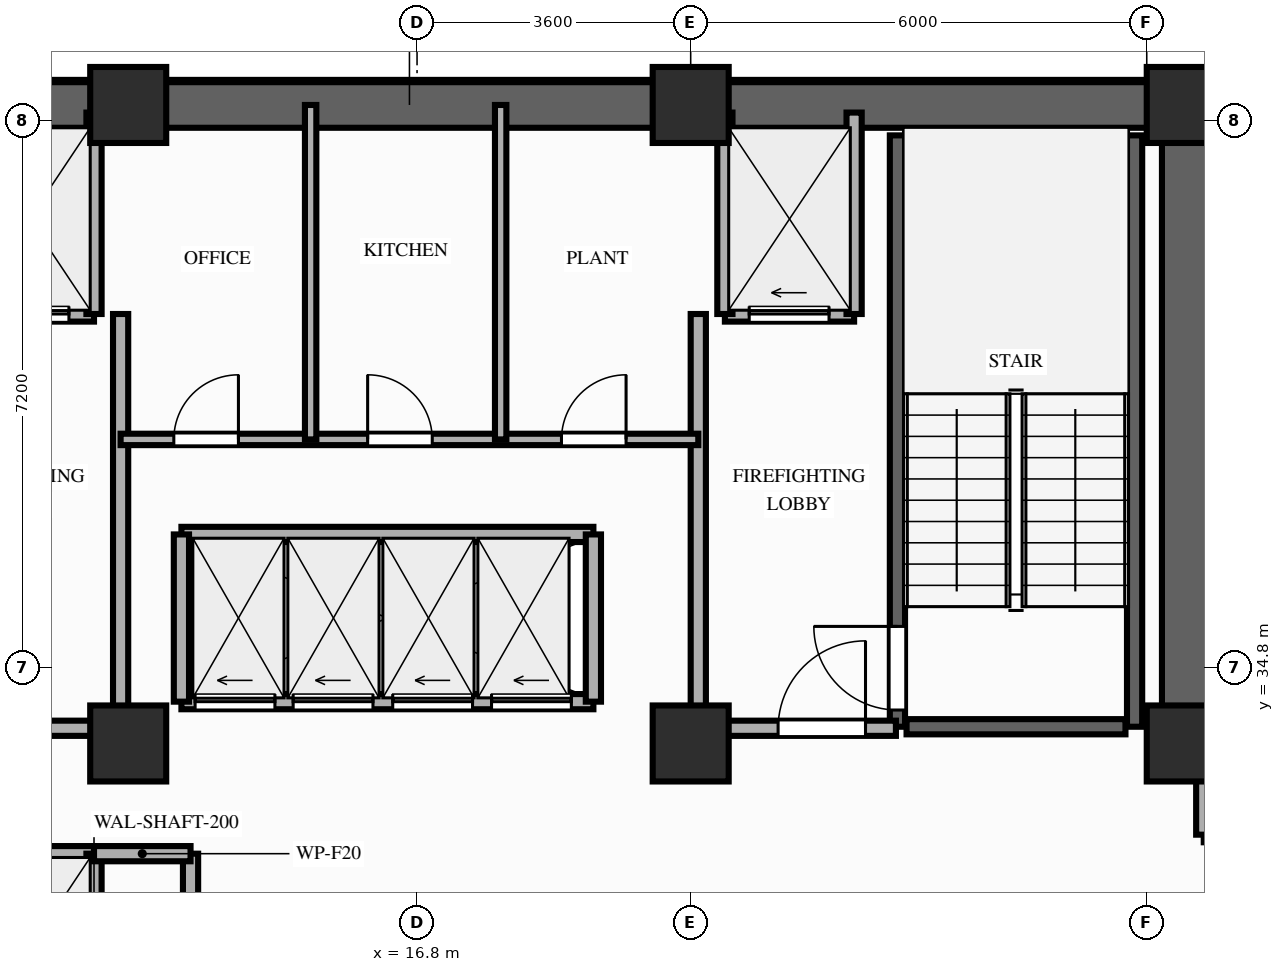
"""IFC4 building model, lengths in metres.
Left out: names, types, materials, properties, quantities, classifications, styles, units other than length and angle.
Written with IfcOpenShell. Run it as: python <this file> out.ifc"""

import sys

from ifc_helpers import new_model, si_unit, direction, frame, frame_2d, origin, origin_2d, place, context, subcontext, project, spatial, rectangle, extrude, element, fill, save


model = new_model("IFC4")
c1 = context("Model", 3, precision=1e-05, world=origin(), true_north=direction((0.0, 1.0)))
c2 = subcontext(c1, "Body", "Model", "MODEL_VIEW")
j1 = project(units=[si_unit("LENGTHUNIT", "METRE"), si_unit("PLANEANGLEUNIT", "RADIAN")], contexts=[c1])
p1 = place(None, origin())
s1 = spatial("IfcSite", under=j1, at=p1, CompositionType="ELEMENT")
p2 = place(p1, origin())
s2 = spatial("IfcBuilding", under=s1, at=p2, CompositionType="ELEMENT")
p3 = place(p2, frame((0.0, 0.0, 152.2)))
s3 = spatial("IfcBuildingStorey", under=s2, at=p3, CompositionType="ELEMENT", Elevation=152.2)
for number, where, z_axis, x_axis in (
    (1, (13.0, 33.8, 0.0), (0.0, 0.0, 1.0), (1.0, 0.0, 0.0)),
    (2, (20.4, 33.8, 0.0), (0.0, 0.0, 1.0), (1.0, 0.0, 0.0)),
    (3, (26.9, 33.8, 0.0), (0.0, 0.0, 1.0), (1.0, 0.0, 0.0)),
    (4, (13.0, 42.2, 0.0), (0.0, 0.0, 1.0), (1.0, 0.0, 0.0)),
    (5, (20.4, 42.2, 0.0), (0.0, 0.0, 1.0), (1.0, 0.0, 0.0)),
    (6, (26.9, 42.2, 0.0), (0.0, 0.0, 1.0), (1.0, 0.0, 0.0)),
):
    element("IfcColumn", number, at=place(p3, frame(where, z_axis=z_axis, x_axis=x_axis)), inside=s3, PredefinedType="COLUMN", context=c2, shape_type="SweptSolid", body=[
        extrude(rectangle(XDim=1.0, YDim=1.0, at=origin_2d()), origin(), (0.0, 0.0, 1.0), 3.8),
    ])
p4 = place(p3, frame((6.45, 42.2, 0.0), z_axis=(0.0, 0.0, 1.0), x_axis=(1.0, 0.0, 0.0)))
e7 = element("IfcWall", 7, at=p4, inside=s3, PredefinedType="SHEAR", context=c2, shape_type="SweptSolid", body=[
    extrude(rectangle(XDim=20.45, YDim=0.6, at=frame_2d((10.225, 0.0))), origin(), (0.0, 0.0, 1.0), 3.56),
])
p5 = place(p3, frame((26.9, 33.8, 0.0), z_axis=(0.0, 0.0, 1.0), x_axis=(0.0, 1.0, 0.0)))
e8 = element("IfcWall", 8, at=p5, inside=s3, PredefinedType="SHEAR", context=c2, shape_type="SweptSolid", body=[
    extrude(rectangle(XDim=7.95, YDim=0.6, at=frame_2d((3.975, 0.0))), origin(), (0.0, 0.0, 1.0), 3.56),
])
p6 = place(p3, frame((23.12, 34.02, 0.0), z_axis=(0.0, 0.0, 1.0), x_axis=(0.0, 1.0, 0.0)))
e9 = element("IfcWall", 9, at=p6, inside=s3, PredefinedType="SHEAR", context=c2, shape_type="SweptSolid", body=[
    extrude(rectangle(XDim=7.78, YDim=0.2, at=frame_2d((3.89, 0.0))), origin(), (0.0, 0.0, 1.0), 3.56),
])
p7 = place(p6, frame((0.22, 0.0, 0.0)))
e10 = element("IfcOpeningElement", 10, at=p7, cuts=e9, PredefinedType="OPENING", context=c2, shape_type="SweptSolid", body=[
    extrude(rectangle(XDim=1.1, YDim=2.15, at=frame_2d((0.55, 1.075))), frame((0.0, 0.11, 0.0), z_axis=(0.0, -1.0, 0.0), x_axis=(1.0, 0.0, 0.0)), (0.0, 0.0, 1.0), 0.22),
])
p8 = place(p3, frame((26.24, 34.02, 0.0), z_axis=(0.0, 0.0, 1.0), x_axis=(0.0, 1.0, 0.0)))
e11 = element("IfcWall", 11, at=p8, inside=s3, PredefinedType="SHEAR", context=c2, shape_type="SweptSolid", body=[
    extrude(rectangle(XDim=7.78, YDim=0.2, at=frame_2d((3.89, 0.0))), origin(), (0.0, 0.0, 1.0), 3.56),
])
p9 = place(p3, frame((23.24, 34.02, 0.0), z_axis=(0.0, 0.0, 1.0), x_axis=(1.0, 0.0, 0.0)))
e12 = element("IfcWall", 12, at=p9, inside=s3, PredefinedType="SHEAR", context=c2, shape_type="SweptSolid", body=[
    extrude(rectangle(XDim=2.88, YDim=0.2, at=frame_2d((1.44, 0.0))), origin(), (0.0, 0.0, 1.0), 3.56),
])
p10 = place(p3, frame((7.0, 32.35, 0.0), z_axis=(0.0, 0.0, 1.0), x_axis=(1.0, 0.0, 0.0)))
e13 = element("IfcWall", 13, at=p10, inside=s3, PredefinedType="MOVABLE", context=c2, shape_type="SweptSolid", body=[
    extrude(rectangle(XDim=5.55, YDim=0.2, at=frame_2d((2.775, 0.0))), origin(), (0.0, 0.0, 1.0), 3.56),
])
p11 = place(p3, frame((12.55, 29.85, 0.0), z_axis=(0.0, 0.0, 1.0), x_axis=(0.0, 1.0, 0.0)))
e14 = element("IfcWall", 14, at=p11, inside=s3, PredefinedType="MOVABLE", context=c2, shape_type="SweptSolid", body=[
    extrude(rectangle(XDim=2.5, YDim=0.2, at=frame_2d((1.25, 0.0))), origin(), (0.0, 0.0, 1.0), 3.56),
])
p12 = place(p3, frame((10.85, 39.45, 0.0), z_axis=(0.0, 0.0, 1.0), x_axis=(1.0, 0.0, 0.0)))
e15 = element("IfcWall", 15, at=p12, inside=s3, PredefinedType="MOVABLE", context=c2, shape_type="SweptSolid", body=[
    extrude(rectangle(XDim=1.7, YDim=0.2, at=frame_2d((0.85, 0.0))), origin(), (0.0, 0.0, 1.0), 3.56),
])
p13 = place(p12, frame((0.32, 0.0, 0.0)))
e16 = element("IfcOpeningElement", 16, at=p13, cuts=e15, PredefinedType="OPENING", context=c2, shape_type="SweptSolid", body=[
    extrude(rectangle(XDim=1.05, YDim=2.15, at=frame_2d((0.525, 1.075))), frame((0.0, 0.11, 0.0), z_axis=(0.0, -1.0, 0.0), x_axis=(1.0, 0.0, 0.0)), (0.0, 0.0, 1.0), 0.22),
])
p14 = place(p3, frame((20.85, 39.45, 0.0), z_axis=(0.0, 0.0, 1.0), x_axis=(1.0, 0.0, 0.0)))
e17 = element("IfcWall", 17, at=p14, inside=s3, PredefinedType="MOVABLE", context=c2, shape_type="SweptSolid", body=[
    extrude(rectangle(XDim=1.7, YDim=0.2, at=frame_2d((0.85, 0.0))), origin(), (0.0, 0.0, 1.0), 3.56),
])
p15 = place(p14, frame((0.32, 0.0, 0.0)))
e18 = element("IfcOpeningElement", 18, at=p15, cuts=e17, PredefinedType="OPENING", context=c2, shape_type="SweptSolid", body=[
    extrude(rectangle(XDim=1.05, YDim=2.15, at=frame_2d((0.525, 1.075))), frame((0.0, 0.11, 0.0), z_axis=(0.0, -1.0, 0.0), x_axis=(1.0, 0.0, 0.0)), (0.0, 0.0, 1.0), 0.22),
])
p16 = place(p3, frame((12.55, 39.45, 0.0), z_axis=(0.0, 0.0, 1.0), x_axis=(0.0, 1.0, 0.0)))
e19 = element("IfcWall", 19, at=p16, inside=s3, PredefinedType="MOVABLE", context=c2, shape_type="SweptSolid", body=[
    extrude(rectangle(XDim=2.65, YDim=0.2, at=frame_2d((1.325, 0.0))), origin(), (0.0, 0.0, 1.0), 2.99),
])
p17 = place(p3, frame((12.9, 34.0, 0.0), z_axis=(0.0, 0.0, 1.0), x_axis=(0.0, 1.0, 0.0)))
e20 = element("IfcWall", 20, at=p17, inside=s3, PredefinedType="PARTITIONING", context=c2, shape_type="SweptSolid", body=[
    extrude(rectangle(XDim=5.45, YDim=0.2, at=frame_2d((2.725, 0.0))), origin(), (0.0, 0.0, 1.0), 2.99),
])
p18 = place(p3, frame((10.24, 34.0, 0.0), z_axis=(0.0, 0.0, 1.0), x_axis=(1.0, 0.0, 0.0)))
e21 = element("IfcWall", 21, at=p18, inside=s3, PredefinedType="PARTITIONING", context=c2, shape_type="SweptSolid", body=[
    extrude(rectangle(XDim=2.66, YDim=0.2, at=frame_2d((1.33, 0.0))), origin(), (0.0, 0.0, 1.0), 2.99),
])
p19 = place(p18, frame((0.35, 0.0, 0.0)))
e22 = element("IfcOpeningElement", 22, at=p19, cuts=e21, PredefinedType="OPENING", context=c2, shape_type="SweptSolid", body=[
    extrude(rectangle(XDim=1.15, YDim=2.15, at=frame_2d((0.575, 1.075))), frame((0.0, 0.11, 0.0), z_axis=(0.0, -1.0, 0.0), x_axis=(1.0, 0.0, 0.0)), (0.0, 0.0, 1.0), 0.22),
])
for number, where, z_axis, x_axis in (
    (23, (20.85, 39.45, 0.0), (0.0, 0.0, 1.0), (0.0, 1.0, 0.0)),
    (24, (22.55, 39.45, 0.0), (0.0, 0.0, 1.0), (0.0, 1.0, 0.0)),
):
    element("IfcWall", number, at=place(p3, frame(where, z_axis=z_axis, x_axis=x_axis)), inside=s3, PredefinedType="MOVABLE", context=c2, shape_type="SweptSolid", body=[
        extrude(rectangle(XDim=2.65, YDim=0.2, at=frame_2d((1.325, 0.0))), origin(), (0.0, 0.0, 1.0), 2.99),
    ])
p20 = place(p3, frame((20.5, 34.0, 0.0), z_axis=(0.0, 0.0, 1.0), x_axis=(0.0, 1.0, 0.0)))
e25 = element("IfcWall", 25, at=p20, inside=s3, PredefinedType="PARTITIONING", context=c2, shape_type="SweptSolid", body=[
    extrude(rectangle(XDim=5.45, YDim=0.2, at=frame_2d((2.725, 0.0))), origin(), (0.0, 0.0, 1.0), 2.99),
])
p21 = place(p3, frame((20.5, 34.0, 0.0), z_axis=(0.0, 0.0, 1.0), x_axis=(1.0, 0.0, 0.0)))
e26 = element("IfcWall", 26, at=p21, inside=s3, PredefinedType="PARTITIONING", context=c2, shape_type="SweptSolid", body=[
    extrude(rectangle(XDim=2.6, YDim=0.2, at=frame_2d((1.3, 0.0))), origin(), (0.0, 0.0, 1.0), 2.99),
])
p22 = place(p21, frame((1.05, 0.0, 0.0)))
e27 = element("IfcOpeningElement", 27, at=p22, cuts=e26, PredefinedType="OPENING", context=c2, shape_type="SweptSolid", body=[
    extrude(rectangle(XDim=1.15, YDim=2.15, at=frame_2d((0.575, 1.075))), frame((0.0, 0.11, 0.0), z_axis=(0.0, -1.0, 0.0), x_axis=(1.0, 0.0, 0.0)), (0.0, 0.0, 1.0), 0.22),
])
p23 = place(p3, frame((13.82, 29.85, 0.0), z_axis=(0.0, 0.0, 1.0), x_axis=(0.0, 1.0, 0.0)))
e28 = element("IfcWall", 28, at=p23, inside=s3, PredefinedType="PARTITIONING", context=c2, shape_type="SweptSolid", body=[
    extrude(rectangle(XDim=2.5, YDim=0.2, at=frame_2d((1.25, 0.0))), origin(), (0.0, 0.0, 1.0), 3.56),
])
p24 = place(p3, frame((12.55, 32.35, 0.0), z_axis=(0.0, 0.0, 1.0), x_axis=(1.0, 0.0, 0.0)))
e29 = element("IfcWall", 29, at=p24, inside=s3, PredefinedType="PARTITIONING", context=c2, shape_type="SweptSolid", body=[
    extrude(rectangle(XDim=1.27, YDim=0.2, at=frame_2d((0.635, 0.0))), origin(), (0.0, 0.0, 1.0), 3.56),
])
p25 = place(p3, frame((12.9, 37.8, 0.0), z_axis=(0.0, 0.0, 1.0), x_axis=(1.0, 0.0, 0.0)))
e30 = element("IfcWall", 30, at=p25, inside=s3, PredefinedType="PARTITIONING", context=c2, shape_type="SweptSolid", body=[
    extrude(rectangle(XDim=7.6, YDim=0.15, at=frame_2d((3.8, 0.0))), origin(), (0.0, 0.0, 1.0), 3.56),
])
p26 = place(p25, frame((0.7, 0.0, 0.0)))
e31 = element("IfcOpeningElement", 31, at=p26, cuts=e30, PredefinedType="OPENING", context=c2, shape_type="SweptSolid", body=[
    extrude(rectangle(XDim=0.85, YDim=2.05, at=frame_2d((0.425, 1.025))), frame((0.0, 0.085, 0.0), z_axis=(0.0, -1.0, 0.0), x_axis=(1.0, 0.0, 0.0)), (0.0, 0.0, 1.0), 0.17),
])
p27 = place(p25, frame((3.25, 0.0, 0.0)))
e32 = element("IfcOpeningElement", 32, at=p27, cuts=e30, PredefinedType="OPENING", context=c2, shape_type="SweptSolid", body=[
    extrude(rectangle(XDim=0.85, YDim=2.05, at=frame_2d((0.425, 1.025))), frame((0.0, 0.085, 0.0), z_axis=(0.0, -1.0, 0.0), x_axis=(1.0, 0.0, 0.0)), (0.0, 0.0, 1.0), 0.17),
])
p28 = place(p25, frame((5.8, 0.0, 0.0)))
e33 = element("IfcOpeningElement", 33, at=p28, cuts=e30, PredefinedType="OPENING", context=c2, shape_type="SweptSolid", body=[
    extrude(rectangle(XDim=0.85, YDim=2.05, at=frame_2d((0.425, 1.025))), frame((0.0, 0.085, 0.0), z_axis=(0.0, -1.0, 0.0), x_axis=(1.0, 0.0, 0.0)), (0.0, 0.0, 1.0), 0.17),
])
for number, where, z_axis, x_axis in (
    (34, (15.4, 37.8, 0.0), (0.0, 0.0, 1.0), (0.0, 1.0, 0.0)),
    (35, (17.9, 37.8, 0.0), (0.0, 0.0, 1.0), (0.0, 1.0, 0.0)),
):
    element("IfcWall", number, at=place(p3, frame(where, z_axis=z_axis, x_axis=x_axis)), inside=s3, PredefinedType="PARTITIONING", context=c2, shape_type="SweptSolid", body=[
        extrude(rectangle(XDim=4.4, YDim=0.15, at=frame_2d((2.2, 0.0))), origin(), (0.0, 0.0, 1.0), 2.99),
    ])
p29 = place(p3, frame((13.7, 34.35, 0.0), z_axis=(0.0, 0.0, 1.0), x_axis=(1.0, 0.0, 0.0)))
e36 = element("IfcWall", 36, at=p29, inside=s3, PredefinedType="MOVABLE", context=c2, shape_type="SweptSolid", body=[
    extrude(rectangle(XDim=5.42, YDim=0.2, at=frame_2d((2.71, 0.0))), origin(), (0.0, 0.0, 1.0), 3.56),
])
p30 = place(p29, frame((0.18, 0.0, 0.0)))
e37 = element("IfcOpeningElement", 37, at=p30, cuts=e36, PredefinedType="OPENING", context=c2, shape_type="SweptSolid", body=[
    extrude(rectangle(XDim=1.05, YDim=2.15, at=frame_2d((0.525, 1.075))), frame((0.0, 0.11, 0.0), z_axis=(0.0, -1.0, 0.0), x_axis=(1.0, 0.0, 0.0)), (0.0, 0.0, 1.0), 0.22),
])
p31 = place(p29, frame((1.47, 0.0, 0.0)))
e38 = element("IfcOpeningElement", 38, at=p31, cuts=e36, PredefinedType="OPENING", context=c2, shape_type="SweptSolid", body=[
    extrude(rectangle(XDim=1.05, YDim=2.15, at=frame_2d((0.525, 1.075))), frame((0.0, 0.11, 0.0), z_axis=(0.0, -1.0, 0.0), x_axis=(1.0, 0.0, 0.0)), (0.0, 0.0, 1.0), 0.22),
])
p32 = place(p29, frame((2.78, 0.0, 0.0)))
e39 = element("IfcOpeningElement", 39, at=p32, cuts=e36, PredefinedType="OPENING", context=c2, shape_type="SweptSolid", body=[
    extrude(rectangle(XDim=1.05, YDim=2.15, at=frame_2d((0.525, 1.075))), frame((0.0, 0.11, 0.0), z_axis=(0.0, -1.0, 0.0), x_axis=(1.0, 0.0, 0.0)), (0.0, 0.0, 1.0), 0.22),
])
p33 = place(p29, frame((4.08, 0.0, 0.0)))
e40 = element("IfcOpeningElement", 40, at=p33, cuts=e36, PredefinedType="OPENING", context=c2, shape_type="SweptSolid", body=[
    extrude(rectangle(XDim=1.05, YDim=2.15, at=frame_2d((0.525, 1.075))), frame((0.0, 0.11, 0.0), z_axis=(0.0, -1.0, 0.0), x_axis=(1.0, 0.0, 0.0)), (0.0, 0.0, 1.0), 0.22),
])
p34 = place(p3, frame((13.7, 36.55, 0.0), z_axis=(0.0, 0.0, 1.0), x_axis=(1.0, 0.0, 0.0)))
e41 = element("IfcWall", 41, at=p34, inside=s3, PredefinedType="MOVABLE", context=c2, shape_type="SweptSolid", body=[
    extrude(rectangle(XDim=5.42, YDim=0.2, at=frame_2d((2.71, 0.0))), origin(), (0.0, 0.0, 1.0), 3.56),
])
for number, where, z_axis, x_axis in (
    (42, (13.7, 34.35, 0.0), (0.0, 0.0, 1.0), (0.0, 1.0, 0.0)),
    (43, (19.12, 34.35, 0.0), (0.0, 0.0, 1.0), (0.0, 1.0, 0.0)),
):
    element("IfcWall", number, at=place(p3, frame(where, z_axis=z_axis, x_axis=x_axis)), inside=s3, PredefinedType="MOVABLE", context=c2, shape_type="SweptSolid", body=[
        extrude(rectangle(XDim=2.2, YDim=0.2, at=frame_2d((1.1, 0.0))), origin(), (0.0, 0.0, 1.0), 3.56),
    ])
p35 = place(p3, frame((27.15, 32.6, 0.0), z_axis=(0.0, 0.0, 1.0), x_axis=(1.0, 0.0, 0.0)))
e44 = element("IfcWall", 44, at=p35, inside=s3, PredefinedType="PARTITIONING", context=c2, shape_type="SweptSolid", body=[
    extrude(rectangle(XDim=14.55, YDim=0.2, at=frame_2d((7.275, 0.0))), origin(), (0.0, 0.0, 1.0), 2.99),
])
p36 = place(p35, frame((1.56, 0.0, 0.0)))
e45 = element("IfcOpeningElement", 45, at=p36, cuts=e44, PredefinedType="OPENING", context=c2, shape_type="SweptSolid", body=[
    extrude(rectangle(XDim=0.95, YDim=2.15, at=frame_2d((0.475, 1.075))), frame((0.0, 0.11, 0.0), z_axis=(0.0, -1.0, 0.0), x_axis=(1.0, 0.0, 0.0)), (0.0, 0.0, 1.0), 0.22),
])
p37 = place(p35, frame((5.19, 0.0, 0.0)))
e46 = element("IfcOpeningElement", 46, at=p37, cuts=e44, PredefinedType="OPENING", context=c2, shape_type="SweptSolid", body=[
    extrude(rectangle(XDim=0.95, YDim=2.15, at=frame_2d((0.475, 1.075))), frame((0.0, 0.11, 0.0), z_axis=(0.0, -1.0, 0.0), x_axis=(1.0, 0.0, 0.0)), (0.0, 0.0, 1.0), 0.22),
])
p38 = place(p35, frame((8.68, 0.0, 0.0)))
e47 = element("IfcOpeningElement", 47, at=p38, cuts=e44, PredefinedType="OPENING", context=c2, shape_type="SweptSolid", body=[
    extrude(rectangle(XDim=0.95, YDim=2.15, at=frame_2d((0.475, 1.075))), frame((0.0, 0.11, 0.0), z_axis=(0.0, -1.0, 0.0), x_axis=(1.0, 0.0, 0.0)), (0.0, 0.0, 1.0), 0.22),
])
p39 = place(p35, frame((12.32, 0.0, 0.0)))
e48 = element("IfcOpeningElement", 48, at=p39, cuts=e44, PredefinedType="OPENING", context=c2, shape_type="SweptSolid", body=[
    extrude(rectangle(XDim=0.95, YDim=2.15, at=frame_2d((0.475, 1.075))), frame((0.0, 0.11, 0.0), z_axis=(0.0, -1.0, 0.0), x_axis=(1.0, 0.0, 0.0)), (0.0, 0.0, 1.0), 0.22),
])
p40 = place(p3, frame((27.15, 32.6, 0.0), z_axis=(0.0, 0.0, 1.0), x_axis=(0.0, 1.0, 0.0)))
e49 = element("IfcWall", 49, at=p40, inside=s3, PredefinedType="PARTITIONING", context=c2, shape_type="SweptSolid", body=[
    extrude(rectangle(XDim=1.08, YDim=0.2, at=frame_2d((0.54, 0.0))), origin(), (0.0, 0.0, 1.0), 2.99),
])
p41 = place(p7, origin())
e50 = element("IfcDoor", 50, at=p41, inside=s3, OperationType="SINGLE_SWING_RIGHT", PredefinedType="DOOR", context=c2, shape_type="SweptSolid", body=[
    extrude(rectangle(XDim=1.1, YDim=2.15, at=frame_2d((0.55, 1.075))), frame((0.0, 0.025, 0.0), z_axis=(0.0, -1.0, 0.0), x_axis=(1.0, 0.0, 0.0)), (0.0, 0.0, 1.0), 0.05),
])
fill(e10, e50)
p42 = place(p13, origin())
e51 = element("IfcDoor", 51, at=p42, inside=s3, OperationType="SLIDING_TO_LEFT", PredefinedType="DOOR", context=c2, shape_type="SweptSolid", body=[
    extrude(rectangle(XDim=1.05, YDim=2.15, at=frame_2d((0.525, 1.075))), frame((0.0, 0.025, 0.0), z_axis=(0.0, -1.0, 0.0), x_axis=(1.0, 0.0, 0.0)), (0.0, 0.0, 1.0), 0.05),
])
fill(e16, e51)
p43 = place(p15, origin())
e52 = element("IfcDoor", 52, at=p43, inside=s3, OperationType="SLIDING_TO_LEFT", PredefinedType="DOOR", context=c2, shape_type="SweptSolid", body=[
    extrude(rectangle(XDim=1.05, YDim=2.15, at=frame_2d((0.525, 1.075))), frame((0.0, 0.025, 0.0), z_axis=(0.0, -1.0, 0.0), x_axis=(1.0, 0.0, 0.0)), (0.0, 0.0, 1.0), 0.05),
])
fill(e18, e52)
p44 = place(p22, origin())
e53 = element("IfcDoor", 53, at=p44, inside=s3, OperationType="SINGLE_SWING_RIGHT", PredefinedType="DOOR", context=c2, shape_type="SweptSolid", body=[
    extrude(rectangle(XDim=1.15, YDim=2.15, at=frame_2d((0.575, 1.075))), frame((0.0, 0.025, 0.0), z_axis=(0.0, -1.0, 0.0), x_axis=(1.0, 0.0, 0.0)), (0.0, 0.0, 1.0), 0.05),
])
fill(e27, e53)
p45 = place(p26, origin())
e54 = element("IfcDoor", 54, at=p45, inside=s3, OperationType="SINGLE_SWING_RIGHT", PredefinedType="DOOR", context=c2, shape_type="SweptSolid", body=[
    extrude(rectangle(XDim=0.85, YDim=2.05, at=frame_2d((0.425, 1.025))), frame((0.0, 0.025, 0.0), z_axis=(0.0, -1.0, 0.0), x_axis=(1.0, 0.0, 0.0)), (0.0, 0.0, 1.0), 0.05),
])
fill(e31, e54)
p46 = place(p27, origin())
e55 = element("IfcDoor", 55, at=p46, inside=s3, OperationType="SINGLE_SWING_LEFT", PredefinedType="DOOR", context=c2, shape_type="SweptSolid", body=[
    extrude(rectangle(XDim=0.85, YDim=2.05, at=frame_2d((0.425, 1.025))), frame((0.0, 0.025, 0.0), z_axis=(0.0, -1.0, 0.0), x_axis=(1.0, 0.0, 0.0)), (0.0, 0.0, 1.0), 0.05),
])
fill(e32, e55)
p47 = place(p28, origin())
e56 = element("IfcDoor", 56, at=p47, inside=s3, OperationType="SINGLE_SWING_RIGHT", PredefinedType="DOOR", context=c2, shape_type="SweptSolid", body=[
    extrude(rectangle(XDim=0.85, YDim=2.05, at=frame_2d((0.425, 1.025))), frame((0.0, 0.025, 0.0), z_axis=(0.0, -1.0, 0.0), x_axis=(1.0, 0.0, 0.0)), (0.0, 0.0, 1.0), 0.05),
])
fill(e33, e56)
p48 = place(p30, origin())
e57 = element("IfcDoor", 57, at=p48, inside=s3, OperationType="SLIDING_TO_LEFT", PredefinedType="DOOR", context=c2, shape_type="SweptSolid", body=[
    extrude(rectangle(XDim=1.05, YDim=2.15, at=frame_2d((0.525, 1.075))), frame((0.0, 0.025, 0.0), z_axis=(0.0, -1.0, 0.0), x_axis=(1.0, 0.0, 0.0)), (0.0, 0.0, 1.0), 0.05),
])
fill(e37, e57)
p49 = place(p31, origin())
e58 = element("IfcDoor", 58, at=p49, inside=s3, OperationType="SLIDING_TO_LEFT", PredefinedType="DOOR", context=c2, shape_type="SweptSolid", body=[
    extrude(rectangle(XDim=1.05, YDim=2.15, at=frame_2d((0.525, 1.075))), frame((0.0, 0.025, 0.0), z_axis=(0.0, -1.0, 0.0), x_axis=(1.0, 0.0, 0.0)), (0.0, 0.0, 1.0), 0.05),
])
fill(e38, e58)
p50 = place(p32, origin())
e59 = element("IfcDoor", 59, at=p50, inside=s3, OperationType="SLIDING_TO_LEFT", PredefinedType="DOOR", context=c2, shape_type="SweptSolid", body=[
    extrude(rectangle(XDim=1.05, YDim=2.15, at=frame_2d((0.525, 1.075))), frame((0.0, 0.025, 0.0), z_axis=(0.0, -1.0, 0.0), x_axis=(1.0, 0.0, 0.0)), (0.0, 0.0, 1.0), 0.05),
])
fill(e39, e59)
p51 = place(p33, origin())
e60 = element("IfcDoor", 60, at=p51, inside=s3, OperationType="SLIDING_TO_LEFT", PredefinedType="DOOR", context=c2, shape_type="SweptSolid", body=[
    extrude(rectangle(XDim=1.05, YDim=2.15, at=frame_2d((0.525, 1.075))), frame((0.0, 0.025, 0.0), z_axis=(0.0, -1.0, 0.0), x_axis=(1.0, 0.0, 0.0)), (0.0, 0.0, 1.0), 0.05),
])
fill(e40, e60)
save(model, sys.argv[1])
